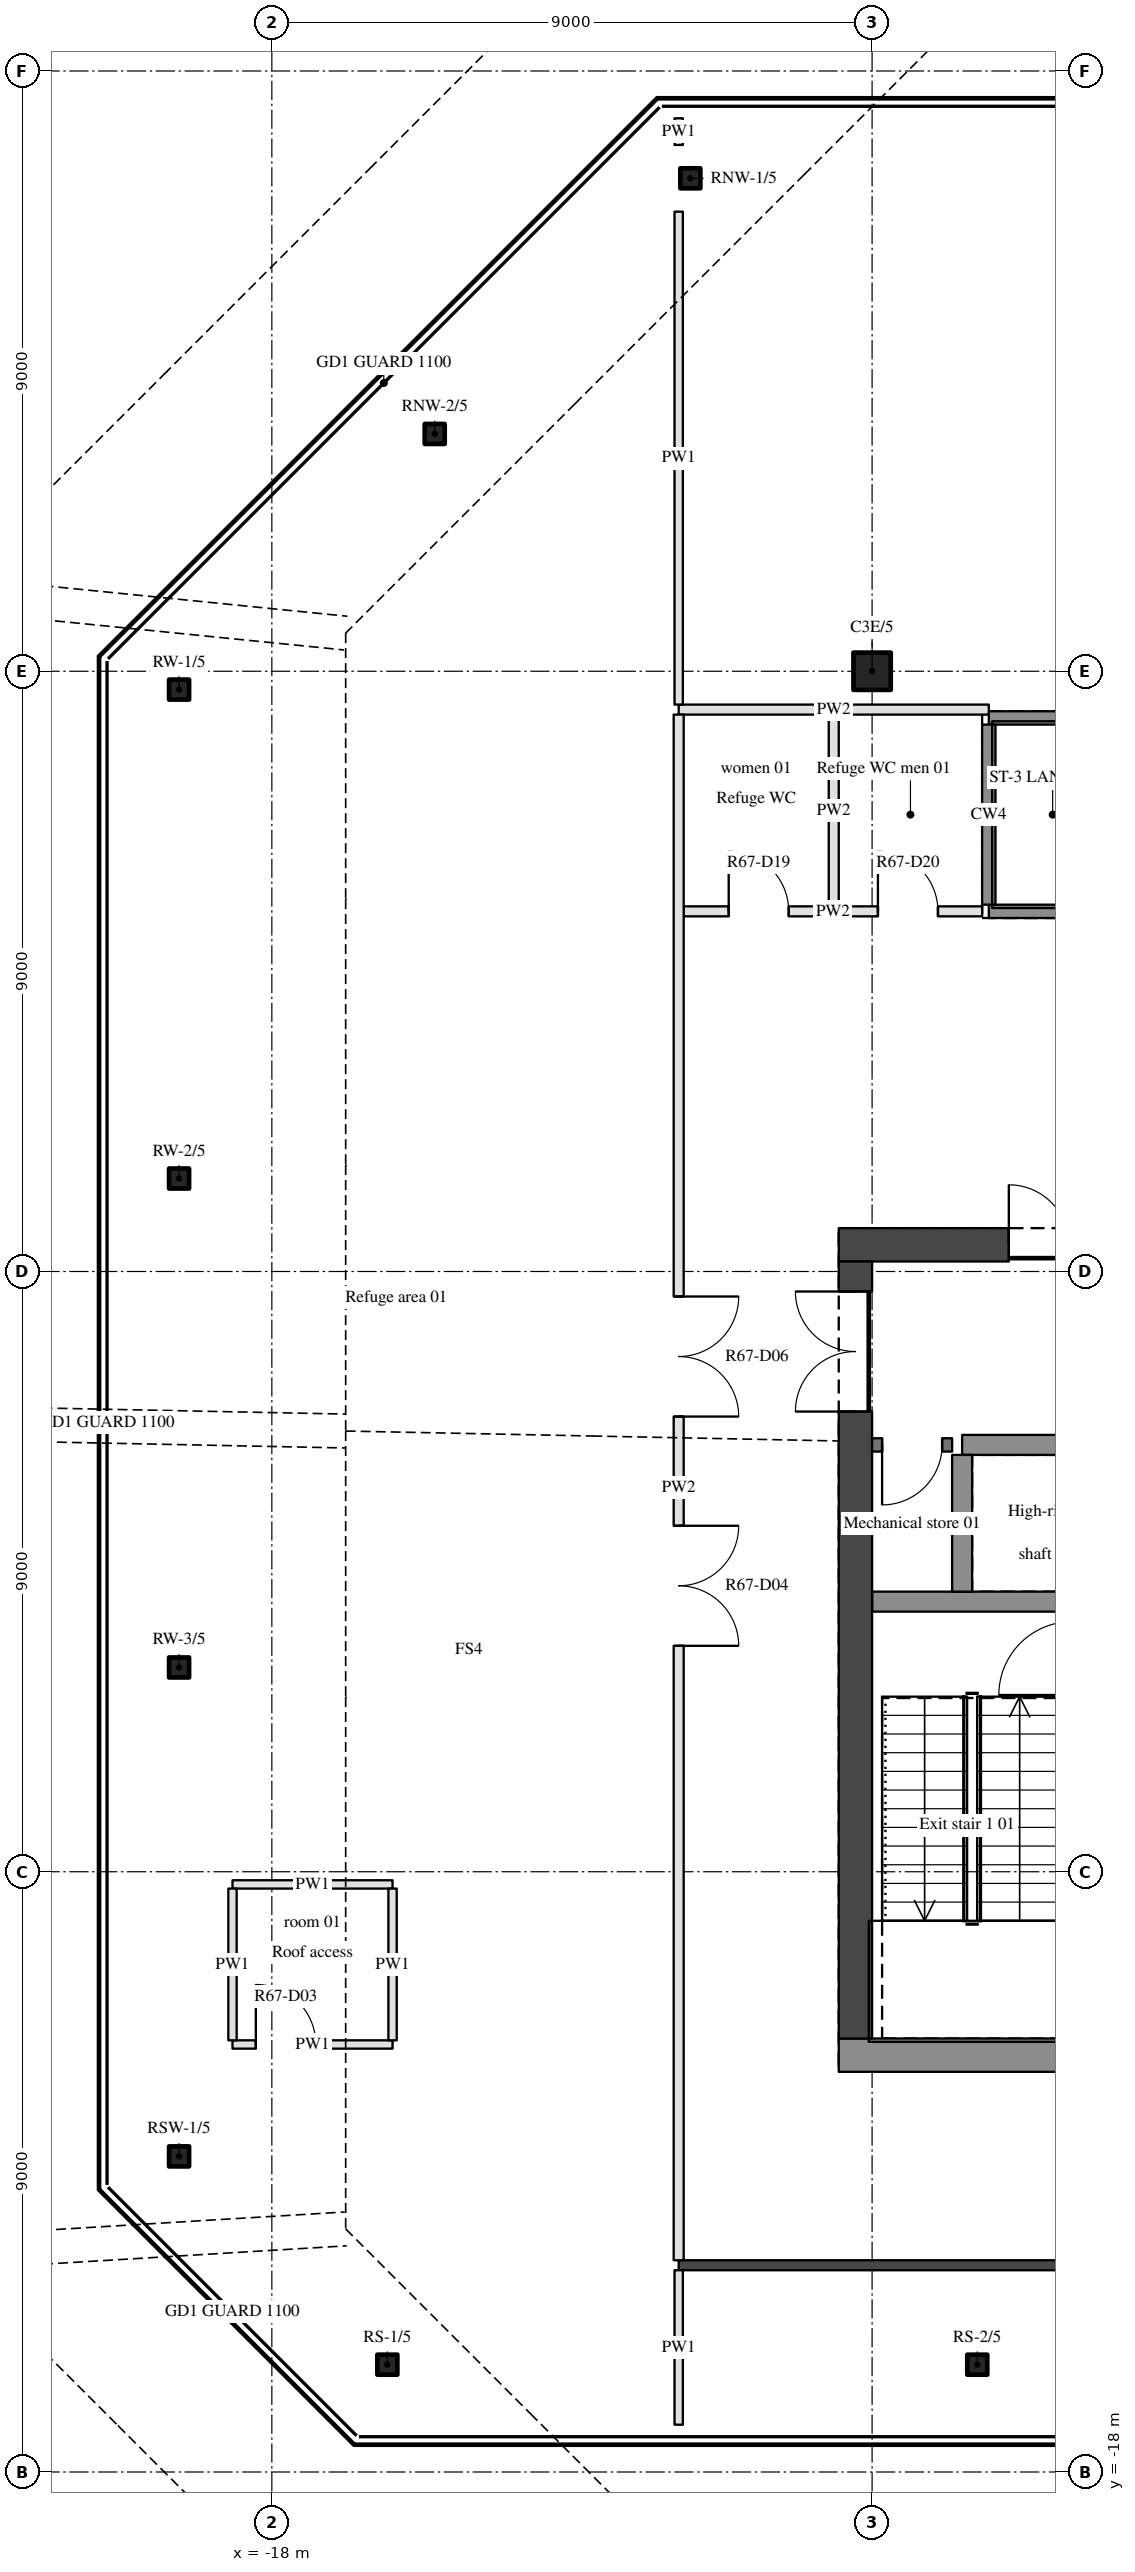
"""IFC4 building model, lengths in metres.
Left out: names, types, materials, properties, quantities, classifications, styles, units other than length and angle.
Written with IfcOpenShell. Run it as: python <this file> out.ifc"""

import sys

from ifc_helpers import new_model, si_unit, direction, frame, frame_2d, origin, origin_2d, place, context, subcontext, project, spatial, rectangle, hollow_rectangle, hollow_circle, extrude, element, fill, save


model = new_model("IFC4")
c1 = context("Model", 3, precision=1e-05, world=origin(), true_north=direction((0.0, 1.0)))
c2 = subcontext(c1, "Body", "Model", "MODEL_VIEW")
j1 = project(units=[si_unit("LENGTHUNIT", "METRE"), si_unit("PLANEANGLEUNIT", "RADIAN")], contexts=[c1])
p1 = place(None, origin())
s1 = spatial("IfcSite", under=j1, at=p1, CompositionType="ELEMENT")
p2 = place(p1, origin())
s2 = spatial("IfcBuilding", under=s1, at=p2, CompositionType="ELEMENT")
p3 = place(p2, frame((0.0, 0.0, 255.0)))
s3 = spatial("IfcBuildingStorey", under=s2, at=p3, CompositionType="ELEMENT", Elevation=255.0)
p4 = place(p3, frame((-9.0, 9.0, 0.0), z_axis=(0.0, 0.0, 1.0), x_axis=(1.0, 0.0, 0.0)))
e1 = element("IfcColumn", 1, at=p4, inside=s3, PredefinedType="COLUMN", context=c2, shape_type="SweptSolid", body=[
    extrude(hollow_circle(Radius=0.28, WallThickness=0.025, at=origin_2d()), origin(), (0.0, 0.0, 1.0), 4.08),
])
p5 = place(p3, frame((-16.268, -16.391, 0.0), z_axis=(0.0, 0.0, 1.0), x_axis=(1.0, 0.0, 0.0)))
e2 = element("IfcColumn", 2, at=p5, inside=s3, PredefinedType="COLUMN", context=c2, shape_type="SweptSolid", body=[
    extrude(hollow_rectangle(XDim=0.3, YDim=0.3, WallThickness=0.02, InnerFilletRadius=0.03, OuterFilletRadius=0.05, at=origin_2d()), origin(), (0.0, 0.0, 1.0), 4.25),
])
p6 = place(p3, frame((-7.423, -16.391, 0.0), z_axis=(0.0, 0.0, 1.0), x_axis=(1.0, 0.0, 0.0)))
e3 = element("IfcColumn", 3, at=p6, inside=s3, PredefinedType="COLUMN", context=c2, shape_type="SweptSolid", body=[
    extrude(hollow_rectangle(XDim=0.3, YDim=0.3, WallThickness=0.02, InnerFilletRadius=0.03, OuterFilletRadius=0.05, at=origin_2d()), origin(), (0.0, 0.0, 1.0), 4.08),
])
for number, where, z_axis, x_axis in (
    (4, (-11.725, 16.391, 0.0), (0.0, 0.0, 1.0), (1.0, 0.0, 0.0)),
    (5, (-15.558, 12.558, 0.0), (0.0, 0.0, 1.0), (1.0, 0.0, 0.0)),
    (6, (-19.391, 8.725, 0.0), (0.0, 0.0, 1.0), (1.0, 0.0, 0.0)),
    (7, (-19.391, 1.394, 0.0), (0.0, 0.0, 1.0), (1.0, 0.0, 0.0)),
    (8, (-19.391, -5.937, 0.0), (0.0, 0.0, 1.0), (1.0, 0.0, 0.0)),
    (9, (-19.391, -13.268, 0.0), (0.0, 0.0, 1.0), (1.0, 0.0, 0.0)),
):
    element("IfcColumn", number, at=place(p3, frame(where, z_axis=z_axis, x_axis=x_axis)), inside=s3, PredefinedType="COLUMN", context=c2, shape_type="SweptSolid", body=[
        extrude(hollow_rectangle(XDim=0.3, YDim=0.3, WallThickness=0.02, InnerFilletRadius=0.03, OuterFilletRadius=0.05, at=origin_2d()), origin(), (0.0, 0.0, 1.0), 4.25),
    ])
p7 = place(p3, frame((-9.5, -11.75, 0.0), z_axis=(0.0, 0.0, 1.0), x_axis=(1.0, 0.0, 0.0)))
e10 = element("IfcWall", 10, at=p7, inside=s3, PredefinedType="SHEAR", context=c2, shape_type="SweptSolid", body=[
    extrude(rectangle(XDim=19.0, YDim=0.5, at=frame_2d((9.5, 0.0))), origin(), (0.0, 0.0, 1.0), 4.5),
])
p8 = place(p3, frame((-9.5, 0.4, 0.0), z_axis=(0.0, 0.0, 1.0), x_axis=(1.0, 0.0, 0.0)))
e11 = element("IfcWall", 11, at=p8, inside=s3, PredefinedType="SHEAR", context=c2, shape_type="SweptSolid", body=[
    extrude(rectangle(XDim=19.0, YDim=0.5, at=frame_2d((9.5, 0.0))), origin(), (0.0, 0.0, 1.0), 4.5),
])
p9 = place(p8, frame((8.6, 0.0, 0.0)))
e12 = element("IfcOpeningElement", 12, at=p9, cuts=e11, PredefinedType="OPENING", context=c2, shape_type="SweptSolid", body=[
    extrude(rectangle(XDim=1.8, YDim=2.1, at=frame_2d((0.9, 1.05))), frame((0.0, 0.26, 0.0), z_axis=(0.0, -1.0, 0.0), x_axis=(1.0, 0.0, 0.0)), (0.0, 0.0, 1.0), 0.52),
])
p10 = place(p8, frame((2.55, 0.0, 0.0)))
e13 = element("IfcOpeningElement", 13, at=p10, cuts=e11, PredefinedType="OPENING", context=c2, shape_type="SweptSolid", body=[
    extrude(rectangle(XDim=0.9, YDim=2.1, at=frame_2d((0.45, 1.05))), frame((0.0, 0.26, 0.0), z_axis=(0.0, -1.0, 0.0), x_axis=(1.0, 0.0, 0.0)), (0.0, 0.0, 1.0), 0.52),
])
p11 = place(p8, frame((15.55, 0.0, 0.0)))
e14 = element("IfcOpeningElement", 14, at=p11, cuts=e11, PredefinedType="OPENING", context=c2, shape_type="SweptSolid", body=[
    extrude(rectangle(XDim=0.9, YDim=2.1, at=frame_2d((0.45, 1.05))), frame((0.0, 0.26, 0.0), z_axis=(0.0, -1.0, 0.0), x_axis=(1.0, 0.0, 0.0)), (0.0, 0.0, 1.0), 0.52),
])
p12 = place(p3, frame((-9.25, -11.5, 0.0), z_axis=(0.0, 0.0, 1.0), x_axis=(0.0, 1.0, 0.0)))
e15 = element("IfcWall", 15, at=p12, inside=s3, PredefinedType="SHEAR", context=c2, shape_type="SweptSolid", body=[
    extrude(rectangle(XDim=11.65, YDim=0.5, at=frame_2d((5.825, 0.0))), origin(), (0.0, 0.0, 1.0), 4.5),
])
p13 = place(p12, frame((9.4, 0.0, 0.0)))
e16 = element("IfcOpeningElement", 16, at=p13, cuts=e15, PredefinedType="OPENING", context=c2, shape_type="SweptSolid", body=[
    extrude(rectangle(XDim=1.8, YDim=2.1, at=frame_2d((0.9, 1.05))), frame((0.0, 0.26, 0.0), z_axis=(0.0, -1.0, 0.0), x_axis=(1.0, 0.0, 0.0)), (0.0, 0.0, 1.0), 0.52),
])
p14 = place(p3, frame((-11.9, -14.9, 0.0), z_axis=(0.0, 0.0, 1.0), x_axis=(1.0, 0.0, 0.0)))
e17 = element("IfcWall", 17, at=p14, inside=s3, PredefinedType="PARTITIONING", context=c2, shape_type="SweptSolid", body=[
    extrude(rectangle(XDim=23.8, YDim=0.15, at=frame_2d((11.9, 0.0))), origin(), (0.0, 0.0, 1.0), 3.08),
])
p15 = place(p14, frame((11.0, 0.0, 0.0)))
e18 = element("IfcOpeningElement", 18, at=p15, cuts=e17, PredefinedType="OPENING", context=c2, shape_type="SweptSolid", body=[
    extrude(rectangle(XDim=1.8, YDim=2.1, at=frame_2d((0.9, 1.05))), frame((0.0, 0.085, 0.0), z_axis=(0.0, -1.0, 0.0), x_axis=(1.0, 0.0, 0.0)), (0.0, 0.0, 1.0), 0.17),
])
p16 = place(p14, frame((8.9, 0.0, 0.0)))
e19 = element("IfcOpeningElement", 19, at=p16, cuts=e17, PredefinedType="OPENING", context=c2, shape_type="SweptSolid", body=[
    extrude(rectangle(XDim=1.8, YDim=2.1, at=frame_2d((0.9, 1.05))), frame((0.0, 0.085, 0.0), z_axis=(0.0, -1.0, 0.0), x_axis=(1.0, 0.0, 0.0)), (0.0, 0.0, 1.0), 0.17),
])
p17 = place(p3, frame((-18.59, -11.59, 0.0), z_axis=(0.0, 0.0, 1.0), x_axis=(1.0, 0.0, 0.0)))
e20 = element("IfcWall", 20, at=p17, inside=s3, PredefinedType="PARTITIONING", context=c2, shape_type="SweptSolid", body=[
    extrude(rectangle(XDim=2.4, YDim=0.125, at=frame_2d((1.2, 0.0))), origin(), (0.0, 0.0, 1.0), 3.56),
])
p18 = place(p17, frame((0.35, 0.0, 0.0)))
e21 = element("IfcOpeningElement", 21, at=p18, cuts=e20, PredefinedType="OPENING", context=c2, shape_type="SweptSolid", body=[
    extrude(rectangle(XDim=0.9, YDim=2.1, at=frame_2d((0.45, 1.05))), frame((0.0, 0.073, 0.0), z_axis=(0.0, -1.0, 0.0), x_axis=(1.0, 0.0, 0.0)), (0.0, 0.0, 1.0), 0.145),
])
p19 = place(p3, frame((-18.59, -9.19, 0.0), z_axis=(0.0, 0.0, 1.0), x_axis=(1.0, 0.0, 0.0)))
e22 = element("IfcWall", 22, at=p19, inside=s3, PredefinedType="PARTITIONING", context=c2, shape_type="SweptSolid", body=[
    extrude(rectangle(XDim=2.4, YDim=0.125, at=frame_2d((1.2, 0.0))), origin(), (0.0, 0.0, 1.0), 3.56),
])
p20 = place(p3, frame((-9.0, -4.95, 0.0), z_axis=(0.0, 0.0, 1.0), x_axis=(1.0, 0.0, 0.0)))
e23 = element("IfcWall", 23, at=p20, inside=s3, PredefinedType="SHEAR", context=c2, shape_type="SweptSolid", body=[
    extrude(rectangle(XDim=6.75, YDim=0.3, at=frame_2d((3.375, 0.0))), origin(), (0.0, 0.0, 1.0), 4.5),
])
p21 = place(p3, frame((-7.8, -2.6, 0.0), z_axis=(0.0, 0.0, 1.0), x_axis=(-1.0, 0.0, 0.0)))
e24 = element("IfcWall", 24, at=p21, inside=s3, PredefinedType="SOLIDWALL", context=c2, shape_type="SweptSolid", body=[
    extrude(rectangle(XDim=1.2, YDim=0.2, at=frame_2d((0.6, 0.0))), origin(), (0.0, 0.0, 1.0), 4.2),
])
p22 = place(p21, frame((0.15, 0.0, 0.0)))
e25 = element("IfcOpeningElement", 25, at=p22, cuts=e24, PredefinedType="OPENING", context=c2, shape_type="SweptSolid", body=[
    extrude(rectangle(XDim=0.9, YDim=2.1, at=frame_2d((0.45, 1.05))), frame((0.0, 0.11, 0.0), z_axis=(0.0, -1.0, 0.0), x_axis=(1.0, 0.0, 0.0)), (0.0, 0.0, 1.0), 0.22),
])
p23 = place(p3, frame((-7.65, -2.6, 0.0), z_axis=(0.0, 0.0, 1.0), x_axis=(1.0, 0.0, 0.0)))
e26 = element("IfcWall", 26, at=p23, inside=s3, PredefinedType="SHEAR", context=c2, shape_type="SweptSolid", body=[
    extrude(rectangle(XDim=5.4, YDim=0.3, at=frame_2d((2.7, 0.0))), origin(), (0.0, 0.0, 1.0), 4.5),
])
p24 = place(p3, frame((-11.825, 5.4, 0.0), z_axis=(0.0, 0.0, 1.0), x_axis=(1.0, 0.0, 0.0)))
e27 = element("IfcWall", 27, at=p24, inside=s3, PredefinedType="PARTITIONING", context=c2, shape_type="SweptSolid", body=[
    extrude(rectangle(XDim=4.475, YDim=0.15, at=frame_2d((2.237, 0.0))), origin(), (0.0, 0.0, 1.0), 3.56),
])
p25 = place(p24, frame((0.675, 0.0, 0.0)))
e28 = element("IfcOpeningElement", 28, at=p25, cuts=e27, PredefinedType="OPENING", context=c2, shape_type="SweptSolid", body=[
    extrude(rectangle(XDim=0.9, YDim=2.1, at=frame_2d((0.45, 1.05))), frame((0.0, 0.085, 0.0), z_axis=(0.0, -1.0, 0.0), x_axis=(1.0, 0.0, 0.0)), (0.0, 0.0, 1.0), 0.17),
])
p26 = place(p24, frame((2.913, 0.0, 0.0)))
e29 = element("IfcOpeningElement", 29, at=p26, cuts=e27, PredefinedType="OPENING", context=c2, shape_type="SweptSolid", body=[
    extrude(rectangle(XDim=0.9, YDim=2.1, at=frame_2d((0.45, 1.05))), frame((0.0, 0.085, 0.0), z_axis=(0.0, -1.0, 0.0), x_axis=(1.0, 0.0, 0.0)), (0.0, 0.0, 1.0), 0.17),
])
p27 = place(p3, frame((-7.25, 5.4, 0.0), z_axis=(0.0, 0.0, 1.0), x_axis=(1.0, 0.0, 0.0)))
e30 = element("IfcWall", 30, at=p27, inside=s3, PredefinedType="SHEAR", context=c2, shape_type="SweptSolid", body=[
    extrude(rectangle(XDim=6.6, YDim=0.2, at=frame_2d((3.3, 0.0))), origin(), (0.0, 0.0, 1.0), 4.5),
])
p28 = place(p27, frame((5.25, 0.0, 0.0)))
e31 = element("IfcOpeningElement", 31, at=p28, cuts=e30, PredefinedType="OPENING", context=c2, shape_type="SweptSolid", body=[
    extrude(rectangle(XDim=1.1, YDim=2.1, at=frame_2d((0.55, 1.05))), frame((0.0, 0.11, 0.0), z_axis=(0.0, -1.0, 0.0), x_axis=(1.0, 0.0, 0.0)), (0.0, 0.0, 1.0), 0.22),
])
p29 = place(p3, frame((-7.25, 8.3, 0.0), z_axis=(0.0, 0.0, 1.0), x_axis=(1.0, 0.0, 0.0)))
e32 = element("IfcWall", 32, at=p29, inside=s3, PredefinedType="SHEAR", context=c2, shape_type="SweptSolid", body=[
    extrude(rectangle(XDim=6.6, YDim=0.2, at=frame_2d((3.3, 0.0))), origin(), (0.0, 0.0, 1.0), 4.5),
])
p30 = place(p3, frame((-11.9, 8.425, 0.0), z_axis=(0.0, 0.0, 1.0), x_axis=(1.0, 0.0, 0.0)))
e33 = element("IfcWall", 33, at=p30, inside=s3, PredefinedType="PARTITIONING", context=c2, shape_type="SweptSolid", body=[
    extrude(rectangle(XDim=4.65, YDim=0.15, at=frame_2d((2.325, 0.0))), origin(), (0.0, 0.0, 1.0), 3.56),
])
for number, where, z_axis, x_axis in (
    (34, (-18.59, -11.528, 0.0), (0.0, 0.0, 1.0), (0.0, 1.0, 0.0)),
    (35, (-16.19, -11.528, 0.0), (0.0, 0.0, 1.0), (0.0, 1.0, 0.0)),
):
    element("IfcWall", number, at=place(p3, frame(where, z_axis=z_axis, x_axis=x_axis)), inside=s3, PredefinedType="PARTITIONING", context=c2, shape_type="SweptSolid", body=[
        extrude(rectangle(XDim=2.275, YDim=0.125, at=frame_2d((1.138, 0.0))), origin(), (0.0, 0.0, 1.0), 3.56),
    ])
p31 = place(p3, frame((-11.9, -17.291, 0.0), z_axis=(0.0, 0.0, 1.0), x_axis=(0.0, 1.0, 0.0)))
e36 = element("IfcWall", 36, at=p31, inside=s3, PredefinedType="PARTITIONING", context=c2, shape_type="SweptSolid", body=[
    extrude(rectangle(XDim=2.316, YDim=0.125, at=frame_2d((1.158, 0.0))), origin(), (0.0, 0.0, 1.0), 3.56),
])
p32 = place(p3, frame((-11.9, 8.35, 0.0), z_axis=(0.0, 0.0, 1.0), x_axis=(0.0, -1.0, 0.0)))
e37 = element("IfcWall", 37, at=p32, inside=s3, PredefinedType="PARTITIONING", context=c2, shape_type="SweptSolid", body=[
    extrude(rectangle(XDim=23.175, YDim=0.15, at=frame_2d((11.587, 0.0))), origin(), (0.0, 0.0, 1.0), 3.56),
])
p33 = place(p32, frame((12.163, 0.0, 0.0)))
e38 = element("IfcOpeningElement", 38, at=p33, cuts=e37, PredefinedType="OPENING", context=c2, shape_type="SweptSolid", body=[
    extrude(rectangle(XDim=1.8, YDim=2.1, at=frame_2d((0.9, 1.05))), frame((0.0, 0.085, 0.0), z_axis=(0.0, -1.0, 0.0), x_axis=(1.0, 0.0, 0.0)), (0.0, 0.0, 1.0), 0.17),
])
p34 = place(p32, frame((8.725, 0.0, 0.0)))
e39 = element("IfcOpeningElement", 39, at=p34, cuts=e37, PredefinedType="OPENING", context=c2, shape_type="SweptSolid", body=[
    extrude(rectangle(XDim=1.8, YDim=2.1, at=frame_2d((0.9, 1.05))), frame((0.0, 0.085, 0.0), z_axis=(0.0, -1.0, 0.0), x_axis=(1.0, 0.0, 0.0)), (0.0, 0.0, 1.0), 0.17),
])
p35 = place(p3, frame((-11.9, 8.5, 0.0), z_axis=(0.0, 0.0, 1.0), x_axis=(0.0, 1.0, 0.0)))
e40 = element("IfcWall", 40, at=p35, inside=s3, PredefinedType="PARTITIONING", context=c2, shape_type="SweptSolid", body=[
    extrude(rectangle(XDim=7.391, YDim=0.125, at=frame_2d((3.696, 0.0))), origin(), (0.0, 0.0, 1.0), 3.56),
])
p36 = place(p3, frame((-11.9, 16.891, 0.0), z_axis=(0.0, 0.0, 1.0), x_axis=(0.0, 1.0, 0.0)))
e41 = element("IfcWall", 41, at=p36, inside=s3, PredefinedType="PARTITIONING", context=c2, shape_type="SweptSolid", body=[
    extrude(rectangle(XDim=0.4, YDim=0.125, at=frame_2d((0.2, 0.0))), origin(), (0.0, 0.0, 1.0), 3.56),
])
p37 = place(p3, frame((-9.575, 5.475, 0.0), z_axis=(0.0, 0.0, 1.0), x_axis=(0.0, 1.0, 0.0)))
e42 = element("IfcWall", 42, at=p37, inside=s3, PredefinedType="PARTITIONING", context=c2, shape_type="SweptSolid", body=[
    extrude(rectangle(XDim=2.875, YDim=0.15, at=frame_2d((1.438, 0.0))), origin(), (0.0, 0.0, 1.0), 3.56),
])
p38 = place(p3, frame((-7.65, -4.8, 0.0), z_axis=(0.0, 0.0, 1.0), x_axis=(0.0, 1.0, 0.0)))
e43 = element("IfcWall", 43, at=p38, inside=s3, PredefinedType="SHEAR", context=c2, shape_type="SweptSolid", body=[
    extrude(rectangle(XDim=2.05, YDim=0.3, at=frame_2d((1.025, 0.0))), origin(), (0.0, 0.0, 1.0), 4.5),
])
p39 = place(p3, frame((-7.25, 5.5, 0.0), z_axis=(0.0, 0.0, 1.0), x_axis=(0.0, 1.0, 0.0)))
e44 = element("IfcWall", 44, at=p39, inside=s3, PredefinedType="SHEAR", context=c2, shape_type="SweptSolid", body=[
    extrude(rectangle(XDim=2.7, YDim=0.2, at=frame_2d((1.35, 0.0))), origin(), (0.0, 0.0, 1.0), 4.5),
])
p40 = place(p13, origin())
e45 = element("IfcDoor", 45, at=p40, inside=s3, OperationType="DOUBLE_DOOR_SINGLE_SWING", PredefinedType="DOOR", context=c2, shape_type="SweptSolid", body=[
    extrude(rectangle(XDim=1.8, YDim=2.1, at=frame_2d((0.9, 1.05))), frame((0.0, 0.025, 0.0), z_axis=(0.0, -1.0, 0.0), x_axis=(1.0, 0.0, 0.0)), (0.0, 0.0, 1.0), 0.05),
])
fill(e16, e45)
p41 = place(p33, origin())
e46 = element("IfcDoor", 46, at=p41, inside=s3, OperationType="DOUBLE_DOOR_SINGLE_SWING", PredefinedType="DOOR", context=c2, shape_type="SweptSolid", body=[
    extrude(rectangle(XDim=1.8, YDim=2.1, at=frame_2d((0.9, 1.05))), frame((0.0, 0.025, 0.0), z_axis=(0.0, -1.0, 0.0), x_axis=(1.0, 0.0, 0.0)), (0.0, 0.0, 1.0), 0.05),
])
fill(e38, e46)
p42 = place(p22, origin())
e47 = element("IfcDoor", 47, at=p42, inside=s3, OperationType="SINGLE_SWING_RIGHT", PredefinedType="DOOR", context=c2, shape_type="SweptSolid", body=[
    extrude(rectangle(XDim=0.9, YDim=2.1, at=frame_2d((0.45, 1.05))), frame((0.0, 0.025, 0.0), z_axis=(0.0, -1.0, 0.0), x_axis=(1.0, 0.0, 0.0)), (0.0, 0.0, 1.0), 0.05),
])
fill(e25, e47)
p43 = place(p10, origin())
e48 = element("IfcDoor", 48, at=p43, inside=s3, OperationType="SINGLE_SWING_LEFT", PredefinedType="DOOR", context=c2, shape_type="SweptSolid", body=[
    extrude(rectangle(XDim=0.9, YDim=2.1, at=frame_2d((0.45, 1.05))), frame((0.0, 0.025, 0.0), z_axis=(0.0, -1.0, 0.0), x_axis=(1.0, 0.0, 0.0)), (0.0, 0.0, 1.0), 0.05),
])
fill(e13, e48)
p44 = place(p25, origin())
e49 = element("IfcDoor", 49, at=p44, inside=s3, OperationType="SINGLE_SWING_LEFT", PredefinedType="DOOR", context=c2, shape_type="SweptSolid", body=[
    extrude(rectangle(XDim=0.9, YDim=2.1, at=frame_2d((0.45, 1.05))), frame((0.0, 0.025, 0.0), z_axis=(0.0, -1.0, 0.0), x_axis=(1.0, 0.0, 0.0)), (0.0, 0.0, 1.0), 0.05),
])
fill(e28, e49)
p45 = place(p26, origin())
e50 = element("IfcDoor", 50, at=p45, inside=s3, OperationType="SINGLE_SWING_LEFT", PredefinedType="DOOR", context=c2, shape_type="SweptSolid", body=[
    extrude(rectangle(XDim=0.9, YDim=2.1, at=frame_2d((0.45, 1.05))), frame((0.0, 0.025, 0.0), z_axis=(0.0, -1.0, 0.0), x_axis=(1.0, 0.0, 0.0)), (0.0, 0.0, 1.0), 0.05),
])
fill(e29, e50)
p46 = place(p34, origin())
e51 = element("IfcDoor", 51, at=p46, inside=s3, OperationType="DOUBLE_DOOR_SINGLE_SWING", PredefinedType="DOOR", context=c2, shape_type="SweptSolid", body=[
    extrude(rectangle(XDim=1.8, YDim=2.1, at=frame_2d((0.9, 1.05))), frame((0.0, 0.025, 0.0), z_axis=(0.0, -1.0, 0.0), x_axis=(1.0, 0.0, 0.0)), (0.0, 0.0, 1.0), 0.05),
])
fill(e39, e51)
p47 = place(p18, origin())
e52 = element("IfcDoor", 52, at=p47, inside=s3, OperationType="SINGLE_SWING_LEFT", PredefinedType="DOOR", context=c2, shape_type="SweptSolid", body=[
    extrude(rectangle(XDim=0.9, YDim=2.1, at=frame_2d((0.45, 1.05))), frame((0.0, 0.025, 0.0), z_axis=(0.0, -1.0, 0.0), x_axis=(1.0, 0.0, 0.0)), (0.0, 0.0, 1.0), 0.05),
])
fill(e21, e52)
save(model, sys.argv[1])
